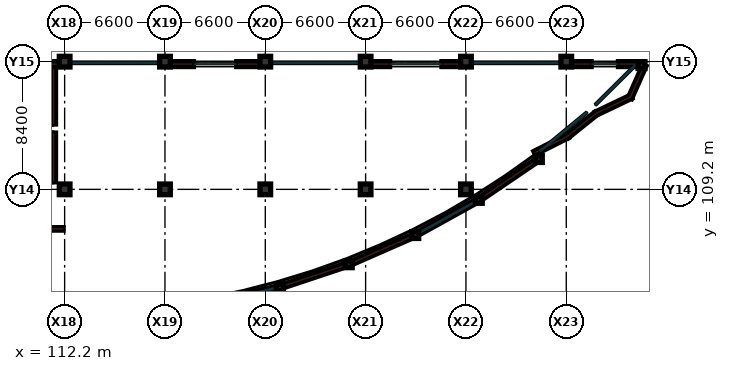
"""IFC4 building model, lengths in metres.
Left out: names, types, materials, properties, quantities, classifications, styles, units other than length and angle.
Written with IfcOpenShell. Run it as: python <this file> out.ifc"""

import sys

from ifc_helpers import new_model, si_unit, direction, frame, frame_2d, origin, origin_2d, place, context, subcontext, project, spatial, rectangle, extrude, element, fill, save


model = new_model("IFC4")
c1 = context("Model", 3, precision=1e-05, world=origin(), true_north=direction((0.0, 1.0)))
c2 = subcontext(c1, "Body", "Model", "MODEL_VIEW")
j1 = project(units=[si_unit("LENGTHUNIT", "METRE"), si_unit("PLANEANGLEUNIT", "RADIAN")], contexts=[c1])
p1 = place(None, origin())
s1 = spatial("IfcSite", under=j1, at=p1, CompositionType="ELEMENT")
p2 = place(p1, origin())
s2 = spatial("IfcBuilding", under=s1, at=p2, CompositionType="ELEMENT")
p3 = place(p2, frame((0.0, 0.0, 5.4)))
s3 = spatial("IfcBuildingStorey", under=s2, at=p3, CompositionType="ELEMENT", Elevation=5.4)
for number, where, z_axis, x_axis in (
    (1, (112.2, 109.2, 0.0), (0.0, 0.0, 1.0), (1.0, 0.0, 0.0)),
    (2, (112.2, 117.6, 0.0), (0.0, 0.0, 1.0), (1.0, 0.0, 0.0)),
    (3, (118.8, 109.2, 0.0), (0.0, 0.0, 1.0), (1.0, 0.0, 0.0)),
    (4, (118.8, 117.6, 0.0), (0.0, 0.0, 1.0), (1.0, 0.0, 0.0)),
    (5, (125.4, 109.2, 0.0), (0.0, 0.0, 1.0), (1.0, 0.0, 0.0)),
    (6, (125.4, 117.6, 0.0), (0.0, 0.0, 1.0), (1.0, 0.0, 0.0)),
    (7, (132.0, 109.2, 0.0), (0.0, 0.0, 1.0), (1.0, 0.0, 0.0)),
    (8, (132.0, 117.6, 0.0), (0.0, 0.0, 1.0), (1.0, 0.0, 0.0)),
    (9, (138.6, 109.2, 0.0), (0.0, 0.0, 1.0), (1.0, 0.0, 0.0)),
    (10, (138.6, 117.6, 0.0), (0.0, 0.0, 1.0), (1.0, 0.0, 0.0)),
    (11, (145.2, 117.6, 0.0), (0.0, 0.0, 1.0), (1.0, 0.0, 0.0)),
):
    element("IfcColumn", number, at=place(p3, frame(where, z_axis=z_axis, x_axis=x_axis)), inside=s3, PredefinedType="COLUMN", context=c2, shape_type="SweptSolid", body=[
        extrude(rectangle(XDim=0.7, YDim=0.7, at=origin_2d()), origin(), (0.0, 0.0, 1.0), 4.5),
    ])
p4 = place(p3, frame((150.15, 117.375, 0.0), z_axis=(0.0, 0.0, 1.0), x_axis=(1.0, 0.0, 0.0)))
e12 = element("IfcColumn", 12, at=p4, inside=s3, PredefinedType="COLUMN", context=c2, shape_type="SweptSolid", body=[
    extrude(rectangle(XDim=0.45, YDim=0.45, at=origin_2d()), origin(), (0.0, 0.0, 1.0), 4.5),
])
p5 = place(p3, frame((126.36, 102.765, 0.0), z_axis=(0.0, 0.0, 1.0), x_axis=(1.0, 0.0, 0.0)))
e13 = element("IfcColumn", 13, at=p5, inside=s3, PredefinedType="COLUMN", context=c2, shape_type="SweptSolid", body=[
    extrude(rectangle(XDim=0.45, YDim=0.45, at=origin_2d()), origin(), (0.0, 0.0, 1.0), 3.05),
])
p6 = place(p3, frame((130.89, 104.275, 0.0), z_axis=(0.0, 0.0, 1.0), x_axis=(1.0, 0.0, 0.0)))
e14 = element("IfcColumn", 14, at=p6, inside=s3, PredefinedType="COLUMN", context=c2, shape_type="SweptSolid", body=[
    extrude(rectangle(XDim=0.45, YDim=0.45, at=origin_2d()), origin(), (0.0, 0.0, 1.0), 3.385),
])
p7 = place(p3, frame((135.265, 106.195, 0.0), z_axis=(0.0, 0.0, 1.0), x_axis=(1.0, 0.0, 0.0)))
e15 = element("IfcColumn", 15, at=p7, inside=s3, PredefinedType="COLUMN", context=c2, shape_type="SweptSolid", body=[
    extrude(rectangle(XDim=0.45, YDim=0.45, at=origin_2d()), origin(), (0.0, 0.0, 1.0), 3.275),
])
p8 = place(p3, frame((139.445, 108.51, 0.0), z_axis=(0.0, 0.0, 1.0), x_axis=(1.0, 0.0, 0.0)))
e16 = element("IfcColumn", 16, at=p8, inside=s3, PredefinedType="COLUMN", context=c2, shape_type="SweptSolid", body=[
    extrude(rectangle(XDim=0.45, YDim=0.45, at=origin_2d()), origin(), (0.0, 0.0, 1.0), 2.71),
])
p9 = place(p3, frame((143.395, 111.195, 0.0), z_axis=(0.0, 0.0, 1.0), x_axis=(1.0, 0.0, 0.0)))
e17 = element("IfcColumn", 17, at=p9, inside=s3, PredefinedType="COLUMN", context=c2, shape_type="SweptSolid", body=[
    extrude(rectangle(XDim=0.45, YDim=0.45, at=origin_2d()), origin(), (0.0, 0.0, 1.0), 1.7),
])
p10 = place(p3, frame((99.2, 106.6, 0.0), z_axis=(0.0, 0.0, 1.0), x_axis=(1.0, 0.0, 0.0)))
e18 = element("IfcWall", 18, at=p10, inside=s3, PredefinedType="PARTITIONING", context=c2, shape_type="SweptSolid", body=[
    extrude(rectangle(XDim=12.9, YDim=0.16, at=frame_2d((6.45, 0.0))), origin(), (0.0, 0.0, 1.0), 3.45),
])
p11 = place(p10, frame((4.2, 0.0, 0.0)))
e19 = element("IfcOpeningElement", 19, at=p11, cuts=e18, PredefinedType="OPENING", context=c2, shape_type="SweptSolid", body=[
    extrude(rectangle(XDim=1.05, YDim=2.15, at=frame_2d((0.525, 1.075))), frame((0.0, 0.09, 0.0), z_axis=(0.0, -1.0, 0.0), x_axis=(1.0, 0.0, 0.0)), (0.0, 0.0, 1.0), 0.18),
])
p12 = place(p3, frame((111.855, 117.44, 0.0), z_axis=(0.0, 0.0, 1.0), x_axis=(-1.0, 0.0, 0.0)))
e20 = element("IfcWall", 20, at=p12, inside=s3, PredefinedType="SOLIDWALL", context=c2, shape_type="SweptSolid", body=[
    extrude(rectangle(XDim=5.91, YDim=0.32, at=frame_2d((2.955, 0.0))), origin(), (0.0, 0.0, 1.0), 3.585),
])
p13 = place(p12, frame((3.15, 0.0, 0.95)))
e21 = element("IfcOpeningElement", 21, at=p13, cuts=e20, PredefinedType="OPENING", context=c2, shape_type="SweptSolid", body=[
    extrude(rectangle(XDim=2.25, YDim=1.55, at=frame_2d((1.125, 0.775))), frame((0.0, 0.17, 0.0), z_axis=(0.0, -1.0, 0.0), x_axis=(1.0, 0.0, 0.0)), (0.0, 0.0, 1.0), 0.34),
])
p14 = place(p3, frame((125.055, 117.44, 0.0), z_axis=(0.0, 0.0, 1.0), x_axis=(-1.0, 0.0, 0.0)))
e22 = element("IfcWall", 22, at=p14, inside=s3, PredefinedType="SOLIDWALL", context=c2, shape_type="SweptSolid", body=[
    extrude(rectangle(XDim=5.91, YDim=0.32, at=frame_2d((2.955, 0.0))), origin(), (0.0, 0.0, 1.0), 3.585),
])
p15 = place(p14, frame((1.53, 0.0, 0.95)))
e23 = element("IfcOpeningElement", 23, at=p15, cuts=e22, PredefinedType="OPENING", context=c2, shape_type="SweptSolid", body=[
    extrude(rectangle(XDim=2.85, YDim=1.65, at=frame_2d((1.425, 0.825))), frame((0.0, 0.17, 0.0), z_axis=(0.0, -1.0, 0.0), x_axis=(1.0, 0.0, 0.0)), (0.0, 0.0, 1.0), 0.34),
])
p16 = place(p3, frame((138.255, 117.44, 0.0), z_axis=(0.0, 0.0, 1.0), x_axis=(-1.0, 0.0, 0.0)))
e24 = element("IfcWall", 24, at=p16, inside=s3, PredefinedType="SOLIDWALL", context=c2, shape_type="SweptSolid", body=[
    extrude(rectangle(XDim=5.91, YDim=0.32, at=frame_2d((2.955, 0.0))), origin(), (0.0, 0.0, 1.0), 3.585),
])
p17 = place(p16, frame((1.23, 0.0, 0.95)))
e25 = element("IfcOpeningElement", 25, at=p17, cuts=e24, PredefinedType="OPENING", context=c2, shape_type="SweptSolid", body=[
    extrude(rectangle(XDim=3.45, YDim=1.7, at=frame_2d((1.725, 0.85))), frame((0.0, 0.17, 0.0), z_axis=(0.0, -1.0, 0.0), x_axis=(1.0, 0.0, 0.0)), (0.0, 0.0, 1.0), 0.34),
])
p18 = place(p3, frame((143.12, 111.6, 0.0), z_axis=(0.0, 0.0, 1.0), x_axis=(0.893180420852, 0.449698494334, 0.0)))
e26 = element("IfcWall", 26, at=p18, inside=s3, PredefinedType="SOLIDWALL", context=c2, shape_type="SweptSolid", body=[
    extrude(rectangle(XDim=2.435, YDim=0.22, at=frame_2d((1.217, 0.0))), origin(), (0.0, 0.0, 1.0), 1.45),
])
p19 = place(p3, frame((145.27, 112.68, 0.0), z_axis=(0.0, 0.0, 1.0), x_axis=(0.780033477486, 0.625737783741, 0.0)))
e27 = element("IfcWall", 27, at=p19, inside=s3, PredefinedType="SOLIDWALL", context=c2, shape_type="SweptSolid", body=[
    extrude(rectangle(XDim=2.397, YDim=0.22, at=frame_2d((1.199, 0.0))), origin(), (0.0, 0.0, 1.0), 1.45),
])
p20 = place(p3, frame((147.17, 114.195, 0.0), z_axis=(0.0, 0.0, 1.0), x_axis=(0.902549728753, 0.430585632747, 0.0)))
e28 = element("IfcWall", 28, at=p20, inside=s3, PredefinedType="SOLIDWALL", context=c2, shape_type="SweptSolid", body=[
    extrude(rectangle(XDim=2.543, YDim=0.22, at=frame_2d((1.271, 0.0))), origin(), (0.0, 0.0, 1.0), 1.45),
])
p21 = place(p3, frame((149.395, 115.215, 0.0), z_axis=(0.0, 0.0, 1.0), x_axis=(0.406516483969, 0.913643447008, 0.0)))
e29 = element("IfcWall", 29, at=p21, inside=s3, PredefinedType="SOLIDWALL", context=c2, shape_type="SweptSolid", body=[
    extrude(rectangle(XDim=2.337, YDim=0.22, at=frame_2d((1.168, 0.0))), origin(), (0.0, 0.0, 1.0), 1.45),
])
p22 = place(p3, frame((121.705, 101.675, 2.26), z_axis=(0.0, 0.0, 1.0), x_axis=(0.973671059154, 0.227957602563, 0.0)))
e30 = element("IfcWall", 30, at=p22, inside=s3, PredefinedType="SOLIDWALL", context=c2, shape_type="SweptSolid", body=[
    extrude(rectangle(XDim=4.781, YDim=0.22, at=frame_2d((2.391, 0.0))), origin(), (0.0, 0.0, 1.0), 1.94),
])
p23 = place(p3, frame((126.36, 102.765, 3.05), z_axis=(0.0, 0.0, 1.0), x_axis=(0.948678184861, 0.316243105172, 0.0)))
e31 = element("IfcWall", 31, at=p23, inside=s3, PredefinedType="SOLIDWALL", context=c2, shape_type="SweptSolid", body=[
    extrude(rectangle(XDim=4.775, YDim=0.22, at=frame_2d((2.387, 0.0))), origin(), (0.0, 0.0, 1.0), 1.44),
])
p24 = place(p3, frame((130.89, 104.275, 3.275), z_axis=(0.0, 0.0, 1.0), x_axis=(0.915687605196, 0.40189079324, 0.0)))
e32 = element("IfcWall", 32, at=p24, inside=s3, PredefinedType="SOLIDWALL", context=c2, shape_type="SweptSolid", body=[
    extrude(rectangle(XDim=4.778, YDim=0.22, at=frame_2d((2.389, 0.0))), origin(), (0.0, 0.0, 1.0), 1.215),
])
p25 = place(p3, frame((135.265, 106.195, 2.71), z_axis=(0.0, 0.0, 1.0), x_axis=(0.874812010837, 0.484462532809, 0.0)))
e33 = element("IfcWall", 33, at=p25, inside=s3, PredefinedType="SOLIDWALL", context=c2, shape_type="SweptSolid", body=[
    extrude(rectangle(XDim=4.778, YDim=0.22, at=frame_2d((2.389, 0.0))), origin(), (0.0, 0.0, 1.0), 1.715),
])
p26 = place(p3, frame((139.445, 108.51, 1.7), z_axis=(0.0, 0.0, 1.0), x_axis=(0.827014911201, 0.562179985993, 0.0)))
e34 = element("IfcWall", 34, at=p26, inside=s3, PredefinedType="SOLIDWALL", context=c2, shape_type="SweptSolid", body=[
    extrude(rectangle(XDim=4.776, YDim=0.22, at=frame_2d((2.388, 0.0))), origin(), (0.0, 0.0, 1.0), 2.16),
])
p27 = place(p3, frame((149.93, 117.44, 0.0), z_axis=(0.0, 0.0, 1.0), x_axis=(-1.0, 0.0, 0.0)))
e35 = element("IfcWall", 35, at=p27, inside=s3, PredefinedType="SOLIDWALL", context=c2, shape_type="SweptSolid", body=[
    extrude(rectangle(XDim=4.385, YDim=0.32, at=frame_2d((2.192, 0.0))), origin(), (0.0, 0.0, 1.0), 3.585),
])
p28 = place(p27, frame((1.295, 0.0, 0.95)))
e36 = element("IfcOpeningElement", 36, at=p28, cuts=e35, PredefinedType="OPENING", context=c2, shape_type="SweptSolid", body=[
    extrude(rectangle(XDim=1.8, YDim=1.6, at=frame_2d((0.9, 0.8))), frame((0.0, 0.17, 0.0), z_axis=(0.0, -1.0, 0.0), x_axis=(1.0, 0.0, 0.0)), (0.0, 0.0, 1.0), 0.34),
])
p29 = place(p3, frame((111.475, 109.7, 0.0), z_axis=(0.0, 0.0, 1.0), x_axis=(0.0, 1.0, 0.0)))
e37 = element("IfcWall", 37, at=p29, inside=s3, PredefinedType="SHEAR", context=c2, shape_type="SweptSolid", body=[
    extrude(rectangle(XDim=3.2, YDim=0.25, at=frame_2d((1.6, 0.0))), origin(), (0.0, 0.0, 1.0), 4.2),
])
p30 = place(p3, frame((111.475, 113.5, 0.0), z_axis=(0.0, 0.0, 1.0), x_axis=(0.0, 1.0, 0.0)))
e38 = element("IfcWall", 38, at=p30, inside=s3, PredefinedType="SHEAR", context=c2, shape_type="SweptSolid", body=[
    extrude(rectangle(XDim=3.6, YDim=0.25, at=frame_2d((1.8, 0.0))), origin(), (0.0, 0.0, 1.0), 4.2),
])
p31 = place(p15, origin())
e39 = element("IfcWindow", 39, at=p31, inside=s3, PartitioningType="SINGLE_PANEL", PredefinedType="WINDOW", context=c2, shape_type="SweptSolid", body=[
    extrude(rectangle(XDim=2.85, YDim=1.65, at=frame_2d((1.425, 0.825))), frame((0.0, 0.03, 0.0), z_axis=(0.0, -1.0, 0.0), x_axis=(1.0, 0.0, 0.0)), (0.0, 0.0, 1.0), 0.06),
])
fill(e23, e39)
p32 = place(p17, origin())
e40 = element("IfcWindow", 40, at=p32, inside=s3, PartitioningType="SINGLE_PANEL", PredefinedType="WINDOW", context=c2, shape_type="SweptSolid", body=[
    extrude(rectangle(XDim=3.45, YDim=1.7, at=frame_2d((1.725, 0.85))), frame((0.0, 0.03, 0.0), z_axis=(0.0, -1.0, 0.0), x_axis=(1.0, 0.0, 0.0)), (0.0, 0.0, 1.0), 0.06),
])
fill(e25, e40)
p33 = place(p28, origin())
e41 = element("IfcWindow", 41, at=p33, inside=s3, PartitioningType="SINGLE_PANEL", PredefinedType="WINDOW", context=c2, shape_type="SweptSolid", body=[
    extrude(rectangle(XDim=1.8, YDim=1.6, at=frame_2d((0.9, 0.8))), frame((0.0, 0.03, 0.0), z_axis=(0.0, -1.0, 0.0), x_axis=(1.0, 0.0, 0.0)), (0.0, 0.0, 1.0), 0.06),
])
fill(e36, e41)
save(model, sys.argv[1])
